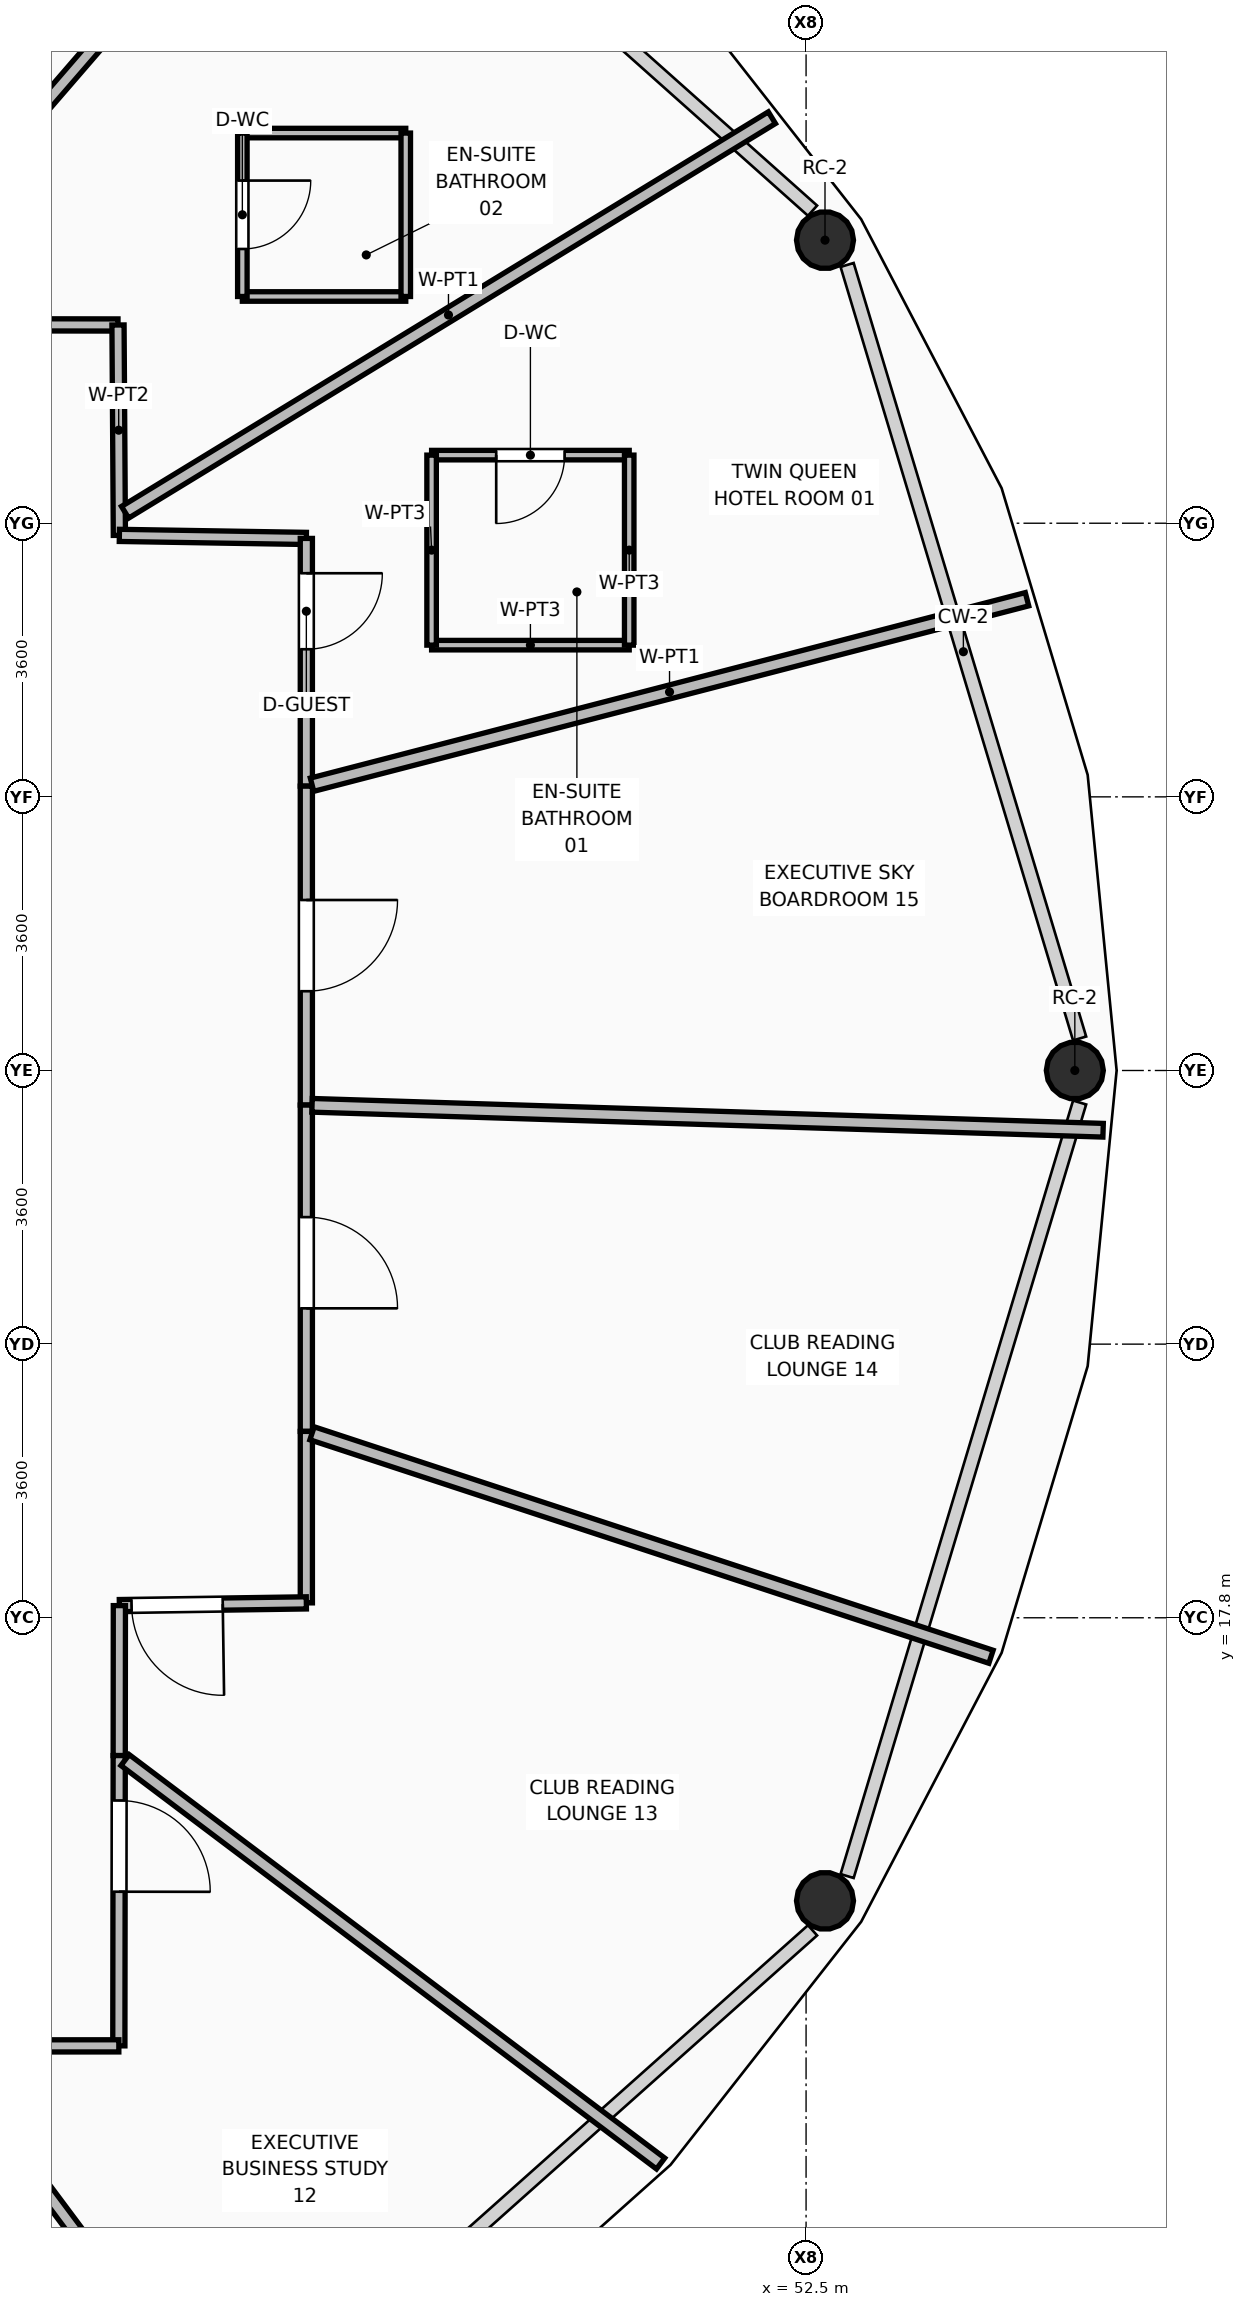
"""IFC4 building model, lengths in metres.
Left out: names, types, materials, properties, quantities, classifications, styles, units other than length and angle.
Written with IfcOpenShell. Run it as: python <this file> out.ifc"""

import sys

from ifc_helpers import new_model, si_unit, direction, frame, frame_2d, origin, origin_2d, place, context, subcontext, project, spatial, rectangle, hollow_circle, extrude, element, fill, save


model = new_model("IFC4")
c1 = context("Model", 3, precision=1e-05, world=origin(), true_north=direction((0.0, 1.0)))
c2 = subcontext(c1, "Body", "Model", "MODEL_VIEW")
j1 = project(units=[si_unit("LENGTHUNIT", "METRE"), si_unit("PLANEANGLEUNIT", "RADIAN")], contexts=[c1])
p1 = place(None, origin())
s1 = spatial("IfcSite", under=j1, at=p1, CompositionType="ELEMENT")
p2 = place(p1, origin())
s2 = spatial("IfcBuilding", under=s1, at=p2, CompositionType="ELEMENT")
p3 = place(p2, frame((0.0, 0.0, 168.45)))
s3 = spatial("IfcBuildingStorey", under=s2, at=p3, CompositionType="ELEMENT", Elevation=168.45)
for number, where, z_axis, x_axis in (
    (1, (56.036, 25.0, 0.0), (0.0, 0.0, 1.0), (1.0, 0.0, 0.0)),
    (2, (52.749, 35.924, 0.0), (0.0, 0.0, 1.0), (1.0, 0.0, 0.0)),
    (3, (52.749, 14.076, 0.0), (0.0, 0.0, 1.0), (1.0, 0.0, 0.0)),
):
    element("IfcColumn", number, at=place(p3, frame(where, z_axis=z_axis, x_axis=x_axis)), inside=s3, PredefinedType="COLUMN", context=c2, shape_type="SweptSolid", body=[
        extrude(hollow_circle(Radius=0.375, WallThickness=0.035, at=origin_2d()), origin(), (0.0, 0.0, 1.0), 3.57),
    ])
p4 = place(p3, frame((39.978, 34.813, 0.0), z_axis=(0.0, 0.0, 1.0), x_axis=(0.999999009391, -0.001407557195, 0.0)))
e4 = element("IfcWall", 4, at=p4, inside=s3, PredefinedType="PARTITIONING", context=c2, shape_type="SweptSolid", body=[
    extrude(rectangle(XDim=3.469, YDim=0.16, at=frame_2d((1.734, 0.0))), origin(), (0.0, 0.0, 1.0), 3.006),
])
p5 = place(p4, frame((0.733, 0.0, 0.0)))
e5 = element("IfcOpeningElement", 5, at=p5, cuts=e4, PredefinedType="OPENING", context=c2, shape_type="SweptSolid", body=[
    extrude(rectangle(XDim=1.0, YDim=2.1, at=frame_2d((0.5, 1.05))), frame((0.0, 0.09, 0.0), z_axis=(0.0, -1.0, 0.0), x_axis=(1.0, 0.0, 0.0)), (0.0, 0.0, 1.0), 0.18),
])
p6 = place(p3, frame((43.447, 34.808, 0.0), z_axis=(0.0, 0.0, 1.0), x_axis=(0.006526585281, -0.999978701615, 0.0)))
e6 = element("IfcWall", 6, at=p6, inside=s3, PredefinedType="PARTITIONING", context=c2, shape_type="SweptSolid", body=[
    extrude(rectangle(XDim=2.768, YDim=0.16, at=frame_2d((1.384, 0.0))), origin(), (0.0, 0.0, 1.0), 3.006),
])
p7 = place(p3, frame((43.465, 32.04, 0.0), z_axis=(0.0, 0.0, 1.0), x_axis=(0.999867567339, -0.016274144605, 0.0)))
e7 = element("IfcWall", 7, at=p7, inside=s3, PredefinedType="PARTITIONING", context=c2, shape_type="SweptSolid", body=[
    extrude(rectangle(XDim=2.46, YDim=0.16, at=frame_2d((1.23, 0.0))), origin(), (0.0, 0.0, 1.0), 3.55),
])
p8 = place(p3, frame((45.925, 32.0, 0.0), z_axis=(0.0, 0.0, 1.0), x_axis=(0.0, -1.0, 0.0)))
e8 = element("IfcWall", 8, at=p8, inside=s3, PredefinedType="PARTITIONING", context=c2, shape_type="SweptSolid", body=[
    extrude(rectangle(XDim=3.259, YDim=0.16, at=frame_2d((1.629, 0.0))), origin(), (0.0, 0.0, 1.0), 3.55),
])
p9 = place(p8, frame((0.458, 0.0, 0.0)))
e9 = element("IfcOpeningElement", 9, at=p9, cuts=e8, PredefinedType="OPENING", context=c2, shape_type="SweptSolid", body=[
    extrude(rectangle(XDim=1.0, YDim=2.1, at=frame_2d((0.5, 1.05))), frame((0.0, 0.09, 0.0), z_axis=(0.0, -1.0, 0.0), x_axis=(1.0, 0.0, 0.0)), (0.0, 0.0, 1.0), 0.18),
])
p10 = place(p3, frame((45.925, 28.741, 0.0), z_axis=(0.0, 0.0, 1.0), x_axis=(0.0, -1.0, 0.0)))
e10 = element("IfcWall", 10, at=p10, inside=s3, PredefinedType="PARTITIONING", context=c2, shape_type="SweptSolid", body=[
    extrude(rectangle(XDim=4.196, YDim=0.16, at=frame_2d((2.098, 0.0))), origin(), (0.0, 0.0, 1.0), 3.55),
])
p11 = place(p10, frame((1.498, 0.0, 0.0)))
e11 = element("IfcOpeningElement", 11, at=p11, cuts=e10, PredefinedType="OPENING", context=c2, shape_type="SweptSolid", body=[
    extrude(rectangle(XDim=1.2, YDim=2.1, at=frame_2d((0.6, 1.05))), frame((0.0, 0.09, 0.0), z_axis=(0.0, -1.0, 0.0), x_axis=(1.0, 0.0, 0.0)), (0.0, 0.0, 1.0), 0.18),
])
p12 = place(p3, frame((45.925, 24.545, 0.0), z_axis=(0.0, 0.0, 1.0), x_axis=(0.0, -1.0, 0.0)))
e12 = element("IfcWall", 12, at=p12, inside=s3, PredefinedType="PARTITIONING", context=c2, shape_type="SweptSolid", body=[
    extrude(rectangle(XDim=4.293, YDim=0.16, at=frame_2d((2.146, 0.0))), origin(), (0.0, 0.0, 1.0), 3.006),
])
p13 = place(p12, frame((1.474, 0.0, 0.0)))
e13 = element("IfcOpeningElement", 13, at=p13, cuts=e12, PredefinedType="OPENING", context=c2, shape_type="SweptSolid", body=[
    extrude(rectangle(XDim=1.2, YDim=2.1, at=frame_2d((0.6, 1.05))), frame((0.0, 0.09, 0.0), z_axis=(0.0, -1.0, 0.0), x_axis=(1.0, 0.0, 0.0)), (0.0, 0.0, 1.0), 0.18),
])
p14 = place(p3, frame((45.925, 20.252, 0.0), z_axis=(0.0, 0.0, 1.0), x_axis=(0.0, -1.0, 0.0)))
e14 = element("IfcWall", 14, at=p14, inside=s3, PredefinedType="PARTITIONING", context=c2, shape_type="SweptSolid", body=[
    extrude(rectangle(XDim=2.256, YDim=0.16, at=frame_2d((1.128, 0.0))), origin(), (0.0, 0.0, 1.0), 3.55),
])
p15 = place(p3, frame((45.925, 17.996, 0.0), z_axis=(0.0, 0.0, 1.0), x_axis=(-0.999892143369, -0.014686784162, 0.0)))
e15 = element("IfcWall", 15, at=p15, inside=s3, PredefinedType="PARTITIONING", context=c2, shape_type="SweptSolid", body=[
    extrude(rectangle(XDim=2.46, YDim=0.16, at=frame_2d((1.23, 0.0))), origin(), (0.0, 0.0, 1.0), 3.55),
])
p16 = place(p15, frame((1.1, 0.0, 0.0)))
e16 = element("IfcOpeningElement", 16, at=p16, cuts=e15, PredefinedType="OPENING", context=c2, shape_type="SweptSolid", body=[
    extrude(rectangle(XDim=1.2, YDim=2.1, at=frame_2d((0.6, 1.05))), frame((0.0, 0.09, 0.0), z_axis=(0.0, -1.0, 0.0), x_axis=(1.0, 0.0, 0.0)), (0.0, 0.0, 1.0), 0.18),
])
p17 = place(p3, frame((43.465, 17.96, 0.0), z_axis=(0.0, 0.0, 1.0), x_axis=(-0.001113722858, -0.999999379811, 0.0)))
e17 = element("IfcWall", 17, at=p17, inside=s3, PredefinedType="PARTITIONING", context=c2, shape_type="SweptSolid", body=[
    extrude(rectangle(XDim=1.973, YDim=0.16, at=frame_2d((0.986, 0.0))), origin(), (0.0, 0.0, 1.0), 3.006),
])
p18 = place(p3, frame((43.463, 15.987, 0.0), z_axis=(0.0, 0.0, 1.0), x_axis=(-0.001278526092, -0.999999182685, 0.0)))
e18 = element("IfcWall", 18, at=p18, inside=s3, PredefinedType="PARTITIONING", context=c2, shape_type="SweptSolid", body=[
    extrude(rectangle(XDim=3.819, YDim=0.16, at=frame_2d((1.91, 0.0))), origin(), (0.0, 0.0, 1.0), 3.55),
])
p19 = place(p18, frame((0.591, 0.0, 0.0)))
e19 = element("IfcOpeningElement", 19, at=p19, cuts=e18, PredefinedType="OPENING", context=c2, shape_type="SweptSolid", body=[
    extrude(rectangle(XDim=1.2, YDim=2.1, at=frame_2d((0.6, 1.05))), frame((0.0, 0.09, 0.0), z_axis=(0.0, -1.0, 0.0), x_axis=(1.0, 0.0, 0.0)), (0.0, 0.0, 1.0), 0.18),
])
p20 = place(p3, frame((43.458, 12.168, 0.0), z_axis=(0.0, 0.0, 1.0), x_axis=(-0.99999991624, -0.000409290869, 0.0)))
e20 = element("IfcWall", 20, at=p20, inside=s3, PredefinedType="PARTITIONING", context=c2, shape_type="SweptSolid", body=[
    extrude(rectangle(XDim=2.386, YDim=0.16, at=frame_2d((1.193, 0.0))), origin(), (0.0, 0.0, 1.0), 3.006),
])
p21 = place(p3, frame((46.0, 28.76, 0.0), z_axis=(0.0, 0.0, 1.0), x_axis=(0.96796954255, 0.251067649639, 0.0)))
e21 = element("IfcWall", 21, at=p21, inside=s3, PredefinedType="PARTITIONING", context=c2, shape_type="SweptSolid", body=[
    extrude(rectangle(XDim=9.718, YDim=0.18, at=frame_2d((4.859, 0.0))), origin(), (0.0, 0.0, 1.0), 2.852),
])
p22 = place(p3, frame((43.54, 32.344, 0.0), z_axis=(0.0, 0.0, 1.0), x_axis=(0.853711993856, 0.520745457537, 0.0)))
e22 = element("IfcWall", 22, at=p22, inside=s3, PredefinedType="PARTITIONING", context=c2, shape_type="SweptSolid", body=[
    extrude(rectangle(XDim=9.968, YDim=0.18, at=frame_2d((4.984, 0.0))), origin(), (0.0, 0.0, 1.0), 2.852),
])
p23 = place(p3, frame((40.044, 34.89, 0.0), z_axis=(0.0, 0.0, 1.0), x_axis=(0.653771871809, 0.756691707125, 0.0)))
e23 = element("IfcWall", 23, at=p23, inside=s3, PredefinedType="PARTITIONING", context=c2, shape_type="SweptSolid", body=[
    extrude(rectangle(XDim=10.203, YDim=0.18, at=frame_2d((5.101, 0.0))), origin(), (0.0, 0.0, 1.0), 2.852),
])
p24 = place(p3, frame((41.14, 12.075, 0.0), z_axis=(0.0, 0.0, 1.0), x_axis=(0.597946680124, -0.8015358805, 0.0)))
e24 = element("IfcWall", 24, at=p24, inside=s3, PredefinedType="PARTITIONING", context=c2, shape_type="SweptSolid", body=[
    extrude(rectangle(XDim=6.95, YDim=0.18, at=frame_2d((3.475, 0.0))), origin(), (0.0, 0.0, 1.0), 2.852),
])
p25 = place(p3, frame((43.54, 15.928, 0.0), z_axis=(0.0, 0.0, 1.0), x_axis=(0.798722893144, -0.601699044347, 0.0)))
e25 = element("IfcWall", 25, at=p25, inside=s3, PredefinedType="PARTITIONING", context=c2, shape_type="SweptSolid", body=[
    extrude(rectangle(XDim=8.822, YDim=0.18, at=frame_2d((4.411, 0.0))), origin(), (0.0, 0.0, 1.0), 2.852),
])
p26 = place(p3, frame((46.0, 20.227, 0.0), z_axis=(0.0, 0.0, 1.0), x_axis=(0.949880965401, -0.312611822502, 0.0)))
e26 = element("IfcWall", 26, at=p26, inside=s3, PredefinedType="PARTITIONING", context=c2, shape_type="SweptSolid", body=[
    extrude(rectangle(XDim=9.405, YDim=0.18, at=frame_2d((4.702, 0.0))), origin(), (0.0, 0.0, 1.0), 2.852),
])
p27 = place(p3, frame((46.0, 24.542, 0.0), z_axis=(0.0, 0.0, 1.0), x_axis=(0.999504152782, -0.031487276329, 0.0)))
e27 = element("IfcWall", 27, at=p27, inside=s3, PredefinedType="PARTITIONING", context=c2, shape_type="SweptSolid", body=[
    extrude(rectangle(XDim=10.413, YDim=0.18, at=frame_2d((5.207, 0.0))), origin(), (0.0, 0.0, 1.0), 2.852),
])
p28 = place(p3, frame((47.573, 30.596, 0.0), z_axis=(0.0, 0.0, 1.0), x_axis=(1.0, 0.0, 0.0)))
e28 = element("IfcWall", 28, at=p28, inside=s3, PredefinedType="PARTITIONING", context=c2, shape_type="SweptSolid", body=[
    extrude(rectangle(XDim=2.6, YDim=0.125, at=frame_2d((1.3, 0.0))), origin(), (0.0, 0.0, 1.0), 3.55),
])
p29 = place(p3, frame((47.573, 33.096, 0.0), z_axis=(0.0, 0.0, 1.0), x_axis=(1.0, 0.0, 0.0)))
e29 = element("IfcWall", 29, at=p29, inside=s3, PredefinedType="PARTITIONING", context=c2, shape_type="SweptSolid", body=[
    extrude(rectangle(XDim=2.6, YDim=0.125, at=frame_2d((1.3, 0.0))), origin(), (0.0, 0.0, 1.0), 3.55),
])
p30 = place(p29, frame((0.85, 0.0, 0.0)))
e30 = element("IfcOpeningElement", 30, at=p30, cuts=e29, PredefinedType="OPENING", context=c2, shape_type="SweptSolid", body=[
    extrude(rectangle(XDim=0.9, YDim=2.1, at=frame_2d((0.45, 1.05))), frame((0.0, 0.073, 0.0), z_axis=(0.0, -1.0, 0.0), x_axis=(1.0, 0.0, 0.0)), (0.0, 0.0, 1.0), 0.145),
])
for number, where, z_axis, x_axis in (
    (31, (47.573, 30.596, 0.0), (0.0, 0.0, 1.0), (0.0, 1.0, 0.0)),
    (32, (50.173, 30.596, 0.0), (0.0, 0.0, 1.0), (0.0, 1.0, 0.0)),
):
    element("IfcWall", number, at=place(p3, frame(where, z_axis=z_axis, x_axis=x_axis)), inside=s3, PredefinedType="PARTITIONING", context=c2, shape_type="SweptSolid", body=[
        extrude(rectangle(XDim=2.5, YDim=0.125, at=frame_2d((1.25, 0.0))), origin(), (0.0, 0.0, 1.0), 3.55),
    ])
for number, where, z_axis, x_axis in (
    (33, (45.083, 35.183, 0.0), (0.0, 0.0, 1.0), (1.0, 0.0, 0.0)),
    (34, (45.083, 37.333, 0.0), (0.0, 0.0, 1.0), (1.0, 0.0, 0.0)),
):
    element("IfcWall", number, at=place(p3, frame(where, z_axis=z_axis, x_axis=x_axis)), inside=s3, PredefinedType="PARTITIONING", context=c2, shape_type="SweptSolid", body=[
        extrude(rectangle(XDim=2.15, YDim=0.125, at=frame_2d((1.075, 0.0))), origin(), (0.0, 0.0, 1.0), 3.55),
    ])
p31 = place(p3, frame((45.083, 35.183, 0.0), z_axis=(0.0, 0.0, 1.0), x_axis=(0.0, 1.0, 0.0)))
e35 = element("IfcWall", 35, at=p31, inside=s3, PredefinedType="PARTITIONING", context=c2, shape_type="SweptSolid", body=[
    extrude(rectangle(XDim=2.15, YDim=0.125, at=frame_2d((1.075, 0.0))), origin(), (0.0, 0.0, 1.0), 3.55),
])
p32 = place(p31, frame((0.625, 0.0, 0.0)))
e36 = element("IfcOpeningElement", 36, at=p32, cuts=e35, PredefinedType="OPENING", context=c2, shape_type="SweptSolid", body=[
    extrude(rectangle(XDim=0.9, YDim=2.1, at=frame_2d((0.45, 1.05))), frame((0.0, 0.073, 0.0), z_axis=(0.0, -1.0, 0.0), x_axis=(1.0, 0.0, 0.0)), (0.0, 0.0, 1.0), 0.145),
])
p33 = place(p3, frame((47.233, 35.183, 0.0), z_axis=(0.0, 0.0, 1.0), x_axis=(0.0, 1.0, 0.0)))
e37 = element("IfcWall", 37, at=p33, inside=s3, PredefinedType="PARTITIONING", context=c2, shape_type="SweptSolid", body=[
    extrude(rectangle(XDim=2.15, YDim=0.125, at=frame_2d((1.075, 0.0))), origin(), (0.0, 0.0, 1.0), 3.55),
])
p34 = place(p30, frame((0.9, 0.0, 0.0), z_axis=(0.0, 0.0, 1.0), x_axis=(-1.0, 0.0, 0.0)))
e38 = element("IfcDoor", 38, at=p34, inside=s3, OperationType="SINGLE_SWING_RIGHT", PredefinedType="DOOR", context=c2, shape_type="SweptSolid", body=[
    extrude(rectangle(XDim=0.9, YDim=2.1, at=frame_2d((0.45, 1.05))), frame((0.0, 0.025, 0.0), z_axis=(0.0, -1.0, 0.0), x_axis=(1.0, 0.0, 0.0)), (0.0, 0.0, 1.0), 0.05),
])
fill(e30, e38)
p35 = place(p9, origin())
e39 = element("IfcDoor", 39, at=p35, inside=s3, OperationType="SINGLE_SWING_LEFT", PredefinedType="DOOR", context=c2, shape_type="SweptSolid", body=[
    extrude(rectangle(XDim=1.0, YDim=2.1, at=frame_2d((0.5, 1.05))), frame((0.0, 0.025, 0.0), z_axis=(0.0, -1.0, 0.0), x_axis=(1.0, 0.0, 0.0)), (0.0, 0.0, 1.0), 0.05),
])
fill(e9, e39)
p36 = place(p32, frame((0.9, 0.0, 0.0), z_axis=(0.0, 0.0, 1.0), x_axis=(-1.0, 0.0, 0.0)))
e40 = element("IfcDoor", 40, at=p36, inside=s3, OperationType="SINGLE_SWING_LEFT", PredefinedType="DOOR", context=c2, shape_type="SweptSolid", body=[
    extrude(rectangle(XDim=0.9, YDim=2.1, at=frame_2d((0.45, 1.05))), frame((0.0, 0.025, 0.0), z_axis=(0.0, -1.0, 0.0), x_axis=(1.0, 0.0, 0.0)), (0.0, 0.0, 1.0), 0.05),
])
fill(e36, e40)
p37 = place(p19, origin())
e41 = element("IfcDoor", 41, at=p37, inside=s3, OperationType="SINGLE_SWING_RIGHT", PredefinedType="DOOR", context=c2, shape_type="SweptSolid", body=[
    extrude(rectangle(XDim=1.2, YDim=2.1, at=frame_2d((0.6, 1.05))), frame((0.0, 0.025, 0.0), z_axis=(0.0, -1.0, 0.0), x_axis=(1.0, 0.0, 0.0)), (0.0, 0.0, 1.0), 0.05),
])
fill(e19, e41)
p38 = place(p16, origin())
e42 = element("IfcDoor", 42, at=p38, inside=s3, OperationType="SINGLE_SWING_LEFT", PredefinedType="DOOR", context=c2, shape_type="SweptSolid", body=[
    extrude(rectangle(XDim=1.2, YDim=2.1, at=frame_2d((0.6, 1.05))), frame((0.0, 0.025, 0.0), z_axis=(0.0, -1.0, 0.0), x_axis=(1.0, 0.0, 0.0)), (0.0, 0.0, 1.0), 0.05),
])
fill(e16, e42)
p39 = place(p13, origin())
e43 = element("IfcDoor", 43, at=p39, inside=s3, OperationType="SINGLE_SWING_RIGHT", PredefinedType="DOOR", context=c2, shape_type="SweptSolid", body=[
    extrude(rectangle(XDim=1.2, YDim=2.1, at=frame_2d((0.6, 1.05))), frame((0.0, 0.025, 0.0), z_axis=(0.0, -1.0, 0.0), x_axis=(1.0, 0.0, 0.0)), (0.0, 0.0, 1.0), 0.05),
])
fill(e13, e43)
p40 = place(p11, origin())
e44 = element("IfcDoor", 44, at=p40, inside=s3, OperationType="SINGLE_SWING_LEFT", PredefinedType="DOOR", context=c2, shape_type="SweptSolid", body=[
    extrude(rectangle(XDim=1.2, YDim=2.1, at=frame_2d((0.6, 1.05))), frame((0.0, 0.025, 0.0), z_axis=(0.0, -1.0, 0.0), x_axis=(1.0, 0.0, 0.0)), (0.0, 0.0, 1.0), 0.05),
])
fill(e11, e44)
save(model, sys.argv[1])
